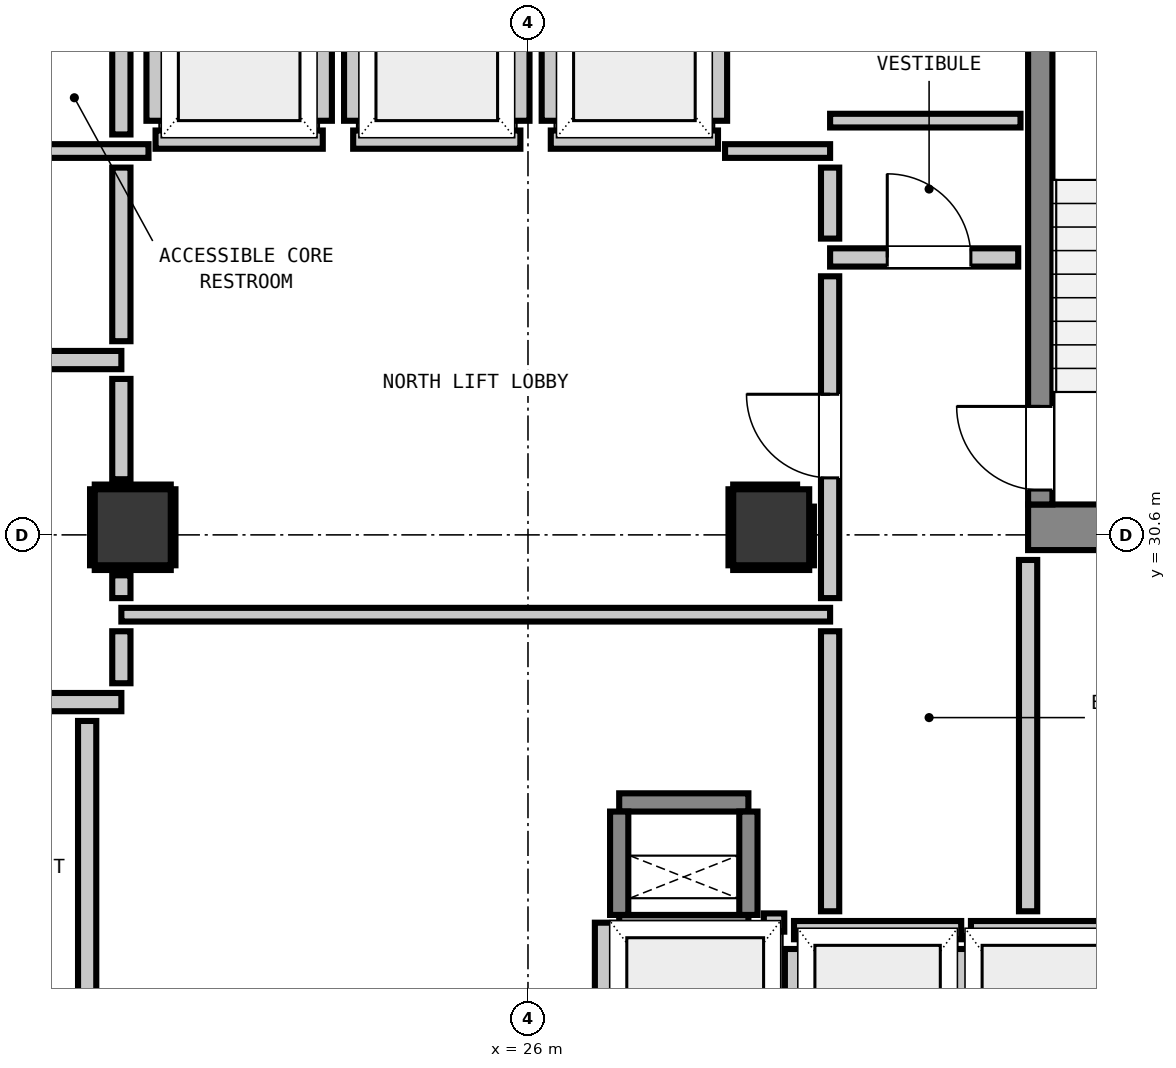
"""IFC4 building model, lengths in metres.
Left out: names, types, materials, properties, quantities, classifications, styles, units other than length and angle.
Written with IfcOpenShell. Run it as: python <this file> out.ifc"""

import sys

from ifc_helpers import new_model, si_unit, direction, frame, frame_2d, origin, origin_2d, place, context, subcontext, project, spatial, rectangle, extrude, element, fill, save


model = new_model("IFC4")
c1 = context("Model", 3, precision=1e-05, world=origin(), true_north=direction((0.0, 1.0)))
c2 = subcontext(c1, "Body", "Model", "MODEL_VIEW")
j1 = project(units=[si_unit("LENGTHUNIT", "METRE"), si_unit("PLANEANGLEUNIT", "RADIAN")], contexts=[c1])
p1 = place(None, origin())
s1 = spatial("IfcSite", under=j1, at=p1, CompositionType="ELEMENT")
p2 = place(p1, origin())
s2 = spatial("IfcBuilding", under=s1, at=p2, CompositionType="ELEMENT")
p3 = place(p2, frame((0.0, 0.0, 85.08)))
s3 = spatial("IfcBuildingStorey", under=s2, at=p3, CompositionType="ELEMENT", Elevation=85.08)
p4 = place(p3, frame((32.58, 30.7, 0.0), z_axis=(0.0, 0.0, 1.0), x_axis=(1.0, 0.0, 0.0)))
e1 = element("IfcWall", 1, at=p4, inside=s3, PredefinedType="SHEAR", context=c2, shape_type="SweptSolid", body=[
    extrude(rectangle(XDim=3.415, YDim=0.6, at=frame_2d((1.708, 0.0))), origin(), (0.0, 0.0, 1.0), 3.32),
])
p5 = place(p3, frame((32.74, 31.0, 0.0), z_axis=(0.0, 0.0, 1.0), x_axis=(0.0, 1.0, 0.0)))
e2 = element("IfcWall", 2, at=p5, inside=s3, PredefinedType="SHEAR", context=c2, shape_type="SweptSolid", body=[
    extrude(rectangle(XDim=7.8, YDim=0.32, at=frame_2d((3.9, 0.0))), origin(), (0.0, 0.0, 1.0), 3.32),
])
p6 = place(p5, frame((0.19, 0.0, 0.0)))
e3 = element("IfcOpeningElement", 3, at=p6, cuts=e2, PredefinedType="OPENING", context=c2, shape_type="SweptSolid", body=[
    extrude(rectangle(XDim=1.1, YDim=2.15, at=frame_2d((0.55, 1.075))), frame((0.0, 0.17, 0.0), z_axis=(0.0, -1.0, 0.0), x_axis=(1.0, 0.0, 0.0)), (0.0, 0.0, 1.0), 0.34),
])
for number, where, z_axis, x_axis in (
    (4, (27.2, 25.48, 0.0), (0.0, 0.0, 1.0), (1.0, 0.0, 0.0)),
    (5, (27.2, 27.08, 0.0), (0.0, 0.0, 1.0), (1.0, 0.0, 0.0)),
):
    element("IfcWall", number, at=place(p3, frame(where, z_axis=z_axis, x_axis=x_axis)), inside=s3, PredefinedType="SHEAR", context=c2, shape_type="SweptSolid", body=[
        extrude(rectangle(XDim=1.7, YDim=0.24, at=frame_2d((0.85, 0.0))), origin(), (0.0, 0.0, 1.0), 3.32),
    ])
for number, where, z_axis, x_axis in (
    (6, (27.2, 25.6, 0.0), (0.0, 0.0, 1.0), (0.0, 1.0, 0.0)),
    (7, (28.9, 25.6, 0.0), (0.0, 0.0, 1.0), (0.0, 1.0, 0.0)),
):
    element("IfcWall", number, at=place(p3, frame(where, z_axis=z_axis, x_axis=x_axis)), inside=s3, PredefinedType="SHEAR", context=c2, shape_type="SweptSolid", body=[
        extrude(rectangle(XDim=1.36, YDim=0.24, at=frame_2d((0.68, 0.0))), origin(), (0.0, 0.0, 1.0), 3.32),
    ])
for number, where, z_axis, x_axis in (
    (8, (20.8, 30.7, 0.0), (0.0, 0.0, 1.0), (1.0, 0.0, 0.0)),
    (9, (29.2, 30.7, 0.0), (0.0, 0.0, 1.0), (1.0, 0.0, 0.0)),
):
    element("IfcColumn", number, at=place(p3, frame(where, z_axis=z_axis, x_axis=x_axis)), inside=s3, PredefinedType="COLUMN", context=c2, shape_type="SweptSolid", body=[
        extrude(rectangle(XDim=1.0, YDim=1.0, at=origin_2d()), origin(), (0.0, 0.0, 1.0), 3.32),
    ])
p7 = place(p3, frame((21.1, 35.8, 0.0), z_axis=(0.0, 0.0, 1.0), x_axis=(1.0, 0.0, 0.0)))
e10 = element("IfcWall", 10, at=p7, inside=s3, PredefinedType="PARTITIONING", context=c2, shape_type="SweptSolid", body=[
    extrude(rectangle(XDim=2.2, YDim=0.24, at=frame_2d((1.1, 0.0))), origin(), (0.0, 0.0, 1.0), 2.96),
])
p8 = place(p3, frame((21.1, 36.048, 0.0), z_axis=(0.0, 0.0, 1.0), x_axis=(0.0, 1.0, 0.0)))
e11 = element("IfcWall", 11, at=p8, inside=s3, PredefinedType="PARTITIONING", context=c2, shape_type="SweptSolid", body=[
    extrude(rectangle(XDim=2.104, YDim=0.24, at=frame_2d((1.052, 0.0))), origin(), (0.0, 0.0, 1.0), 2.195),
])
p9 = place(p3, frame((23.3, 36.048, 0.0), z_axis=(0.0, 0.0, 1.0), x_axis=(0.0, 1.0, 0.0)))
e12 = element("IfcWall", 12, at=p9, inside=s3, PredefinedType="PARTITIONING", context=c2, shape_type="SweptSolid", body=[
    extrude(rectangle(XDim=2.104, YDim=0.24, at=frame_2d((1.052, 0.0))), origin(), (0.0, 0.0, 1.0), 2.96),
])
p10 = place(p3, frame((23.7, 35.8, 0.0), z_axis=(0.0, 0.0, 1.0), x_axis=(1.0, 0.0, 0.0)))
e13 = element("IfcWall", 13, at=p10, inside=s3, PredefinedType="PARTITIONING", context=c2, shape_type="SweptSolid", body=[
    extrude(rectangle(XDim=2.2, YDim=0.24, at=frame_2d((1.1, 0.0))), origin(), (0.0, 0.0, 1.0), 2.96),
])
for number, where, z_axis, x_axis in (
    (14, (23.7, 36.048, 0.0), (0.0, 0.0, 1.0), (0.0, 1.0, 0.0)),
    (15, (25.9, 36.048, 0.0), (0.0, 0.0, 1.0), (0.0, 1.0, 0.0)),
):
    element("IfcWall", number, at=place(p3, frame(where, z_axis=z_axis, x_axis=x_axis)), inside=s3, PredefinedType="PARTITIONING", context=c2, shape_type="SweptSolid", body=[
        extrude(rectangle(XDim=2.104, YDim=0.24, at=frame_2d((1.052, 0.0))), origin(), (0.0, 0.0, 1.0), 2.96),
    ])
p11 = place(p3, frame((26.3, 35.8, 0.0), z_axis=(0.0, 0.0, 1.0), x_axis=(1.0, 0.0, 0.0)))
e16 = element("IfcWall", 16, at=p11, inside=s3, PredefinedType="PARTITIONING", context=c2, shape_type="SweptSolid", body=[
    extrude(rectangle(XDim=2.2, YDim=0.24, at=frame_2d((1.1, 0.0))), origin(), (0.0, 0.0, 1.0), 2.96),
])
for number, where, z_axis, x_axis in (
    (17, (26.3, 36.048, 0.0), (0.0, 0.0, 1.0), (0.0, 1.0, 0.0)),
    (18, (28.5, 36.048, 0.0), (0.0, 0.0, 1.0), (0.0, 1.0, 0.0)),
):
    element("IfcWall", number, at=place(p3, frame(where, z_axis=z_axis, x_axis=x_axis)), inside=s3, PredefinedType="PARTITIONING", context=c2, shape_type="SweptSolid", body=[
        extrude(rectangle(XDim=2.104, YDim=0.24, at=frame_2d((1.052, 0.0))), origin(), (0.0, 0.0, 1.0), 2.96),
    ])
p12 = place(p3, frame((29.5, 25.4, 0.0), z_axis=(0.0, 0.0, 1.0), x_axis=(1.0, 0.0, 0.0)))
e19 = element("IfcWall", 19, at=p12, inside=s3, PredefinedType="PARTITIONING", context=c2, shape_type="SweptSolid", body=[
    extrude(rectangle(XDim=2.2, YDim=0.24, at=frame_2d((1.1, 0.0))), origin(), (0.0, 0.0, 1.0), 2.96),
])
p13 = place(p3, frame((29.5, 22.632, 0.0), z_axis=(0.0, 0.0, 1.0), x_axis=(0.0, 1.0, 0.0)))
e20 = element("IfcWall", 20, at=p13, inside=s3, PredefinedType="PARTITIONING", context=c2, shape_type="SweptSolid", body=[
    extrude(rectangle(XDim=2.52, YDim=0.24, at=frame_2d((1.26, 0.0))), origin(), (0.0, 0.0, 1.0), 2.195),
])
p14 = place(p3, frame((31.7, 22.73, 0.0), z_axis=(0.0, 0.0, 1.0), x_axis=(0.0, 1.0, 0.0)))
e21 = element("IfcWall", 21, at=p14, inside=s3, PredefinedType="PARTITIONING", context=c2, shape_type="SweptSolid", body=[
    extrude(rectangle(XDim=2.422, YDim=0.24, at=frame_2d((1.211, 0.0))), origin(), (0.0, 0.0, 1.0), 2.96),
])
p15 = place(p3, frame((31.828, 25.4, 0.0), z_axis=(0.0, 0.0, 1.0), x_axis=(1.0, 0.0, 0.0)))
e22 = element("IfcWall", 22, at=p15, inside=s3, PredefinedType="PARTITIONING", context=c2, shape_type="SweptSolid", body=[
    extrude(rectangle(XDim=2.072, YDim=0.24, at=frame_2d((1.036, 0.0))), origin(), (0.0, 0.0, 1.0), 2.96),
])
p16 = place(p3, frame((29.103, 25.5, 0.0), z_axis=(0.0, 0.0, 1.0), x_axis=(1.0, 0.0, 0.0)))
e23 = element("IfcWall", 23, at=p16, inside=s3, PredefinedType="PARTITIONING", context=c2, shape_type="SweptSolid", body=[
    extrude(rectangle(XDim=0.269, YDim=0.24, at=frame_2d((0.135, 0.0))), origin(), (0.0, 0.0, 1.0), 2.96),
])
p17 = place(p3, frame((27.0, 22.73, 0.0), z_axis=(0.0, 0.0, 1.0), x_axis=(0.0, 1.0, 0.0)))
e24 = element("IfcWall", 24, at=p17, inside=s3, PredefinedType="PARTITIONING", context=c2, shape_type="SweptSolid", body=[
    extrude(rectangle(XDim=2.768, YDim=0.24, at=frame_2d((1.384, 0.0))), origin(), (0.0, 0.0, 1.0), 2.96),
])
p18 = place(p3, frame((17.45, 28.4, 0.0), z_axis=(0.0, 0.0, 1.0), x_axis=(1.0, 0.0, 0.0)))
e25 = element("IfcWall", 25, at=p18, inside=s3, PredefinedType="PARTITIONING", context=c2, shape_type="SweptSolid", body=[
    extrude(rectangle(XDim=3.2, YDim=0.24, at=frame_2d((1.6, 0.0))), origin(), (0.0, 0.0, 1.0), 2.96),
])
p19 = place(p18, frame((0.784, 0.0, 0.0)))
e26 = element("IfcOpeningElement", 26, at=p19, cuts=e25, PredefinedType="OPENING", context=c2, shape_type="SweptSolid", body=[
    extrude(rectangle(XDim=1.1, YDim=2.15, at=frame_2d((0.55, 1.075))), frame((0.0, 0.13, 0.0), z_axis=(0.0, -1.0, 0.0), x_axis=(1.0, 0.0, 0.0)), (0.0, 0.0, 1.0), 0.26),
])
p20 = place(p3, frame((17.45, 32.9, 0.0), z_axis=(0.0, 0.0, 1.0), x_axis=(1.0, 0.0, 0.0)))
e27 = element("IfcWall", 27, at=p20, inside=s3, PredefinedType="PARTITIONING", context=c2, shape_type="SweptSolid", body=[
    extrude(rectangle(XDim=3.2, YDim=0.24, at=frame_2d((1.6, 0.0))), origin(), (0.0, 0.0, 1.0), 2.96),
])
p21 = place(p20, frame((0.159, 0.0, 0.0)))
e28 = element("IfcOpeningElement", 28, at=p21, cuts=e27, PredefinedType="OPENING", context=c2, shape_type="SweptSolid", body=[
    extrude(rectangle(XDim=1.1, YDim=2.15, at=frame_2d((0.55, 1.075))), frame((0.0, 0.13, 0.0), z_axis=(0.0, -1.0, 0.0), x_axis=(1.0, 0.0, 0.0)), (0.0, 0.0, 1.0), 0.26),
])
p22 = place(p3, frame((29.975, 34.25, 0.0), z_axis=(0.0, 0.0, 1.0), x_axis=(1.0, 0.0, 0.0)))
e29 = element("IfcWall", 29, at=p22, inside=s3, PredefinedType="PARTITIONING", context=c2, shape_type="SweptSolid", body=[
    extrude(rectangle(XDim=2.475, YDim=0.24, at=frame_2d((1.237, 0.0))), origin(), (0.0, 0.0, 1.0), 2.96),
])
p23 = place(p22, frame((0.752, 0.0, 0.0)))
e30 = element("IfcOpeningElement", 30, at=p23, cuts=e29, PredefinedType="OPENING", context=c2, shape_type="SweptSolid", body=[
    extrude(rectangle(XDim=1.1, YDim=2.15, at=frame_2d((0.55, 1.075))), frame((0.0, 0.13, 0.0), z_axis=(0.0, -1.0, 0.0), x_axis=(1.0, 0.0, 0.0)), (0.0, 0.0, 1.0), 0.26),
])
p24 = place(p3, frame((20.65, 29.55, 0.0), z_axis=(0.0, 0.0, 1.0), x_axis=(1.0, 0.0, 0.0)))
e31 = element("IfcWall", 31, at=p24, inside=s3, PredefinedType="PARTITIONING", context=c2, shape_type="SweptSolid", body=[
    extrude(rectangle(XDim=9.325, YDim=0.18, at=frame_2d((4.663, 0.0))), origin(), (0.0, 0.0, 1.0), 2.96),
])
p25 = place(p3, frame((18.95, 35.65, 0.0), z_axis=(0.0, 0.0, 1.0), x_axis=(1.0, 0.0, 0.0)))
e32 = element("IfcWall", 32, at=p25, inside=s3, PredefinedType="PARTITIONING", context=c2, shape_type="SweptSolid", body=[
    extrude(rectangle(XDim=2.057, YDim=0.18, at=frame_2d((1.029, 0.0))), origin(), (0.0, 0.0, 1.0), 2.96),
])
p26 = place(p3, frame((28.593, 35.65, 0.0), z_axis=(0.0, 0.0, 1.0), x_axis=(1.0, 0.0, 0.0)))
e33 = element("IfcWall", 33, at=p26, inside=s3, PredefinedType="PARTITIONING", context=c2, shape_type="SweptSolid", body=[
    extrude(rectangle(XDim=1.382, YDim=0.18, at=frame_2d((0.691, 0.0))), origin(), (0.0, 0.0, 1.0), 2.96),
])
p27 = place(p3, frame((29.975, 36.05, 0.0), z_axis=(0.0, 0.0, 1.0), x_axis=(1.0, 0.0, 0.0)))
e34 = element("IfcWall", 34, at=p27, inside=s3, PredefinedType="PARTITIONING", context=c2, shape_type="SweptSolid", body=[
    extrude(rectangle(XDim=2.505, YDim=0.18, at=frame_2d((1.252, 0.0))), origin(), (0.0, 0.0, 1.0), 2.96),
])
p28 = place(p3, frame((20.2, 22.586, 0.0), z_axis=(0.0, 0.0, 1.0), x_axis=(0.0, 1.0, 0.0)))
e35 = element("IfcWall", 35, at=p28, inside=s3, PredefinedType="PARTITIONING", context=c2, shape_type="SweptSolid", body=[
    extrude(rectangle(XDim=5.566, YDim=0.24, at=frame_2d((2.783, 0.0))), origin(), (0.0, 0.0, 1.0), 2.96),
])
p29 = place(p3, frame((20.65, 28.648, 0.0), z_axis=(0.0, 0.0, 1.0), x_axis=(0.0, 1.0, 0.0)))
e36 = element("IfcWall", 36, at=p29, inside=s3, PredefinedType="PARTITIONING", context=c2, shape_type="SweptSolid", body=[
    extrude(rectangle(XDim=0.684, YDim=0.24, at=frame_2d((0.342, 0.0))), origin(), (0.0, 0.0, 1.0), 2.195),
])
p30 = place(p3, frame((20.65, 29.768, 0.0), z_axis=(0.0, 0.0, 1.0), x_axis=(0.0, 1.0, 0.0)))
e37 = element("IfcWall", 37, at=p30, inside=s3, PredefinedType="PARTITIONING", context=c2, shape_type="SweptSolid", body=[
    extrude(rectangle(XDim=0.3, YDim=0.24, at=frame_2d((0.15, 0.0))), origin(), (0.0, 0.0, 1.0), 2.195),
])
p31 = place(p3, frame((20.65, 31.332, 0.0), z_axis=(0.0, 0.0, 1.0), x_axis=(0.0, 1.0, 0.0)))
e38 = element("IfcWall", 38, at=p31, inside=s3, PredefinedType="PARTITIONING", context=c2, shape_type="SweptSolid", body=[
    extrude(rectangle(XDim=1.32, YDim=0.24, at=frame_2d((0.66, 0.0))), origin(), (0.0, 0.0, 1.0), 2.195),
])
p32 = place(p3, frame((20.65, 33.148, 0.0), z_axis=(0.0, 0.0, 1.0), x_axis=(0.0, 1.0, 0.0)))
e39 = element("IfcWall", 39, at=p32, inside=s3, PredefinedType="PARTITIONING", context=c2, shape_type="SweptSolid", body=[
    extrude(rectangle(XDim=2.284, YDim=0.24, at=frame_2d((1.142, 0.0))), origin(), (0.0, 0.0, 1.0), 2.195),
])
p33 = place(p3, frame((20.65, 35.868, 0.0), z_axis=(0.0, 0.0, 1.0), x_axis=(0.0, 1.0, 0.0)))
e40 = element("IfcWall", 40, at=p33, inside=s3, PredefinedType="PARTITIONING", context=c2, shape_type="SweptSolid", body=[
    extrude(rectangle(XDim=2.684, YDim=0.24, at=frame_2d((1.342, 0.0))), origin(), (0.0, 0.0, 1.0), 2.195),
])
p34 = place(p3, frame((29.975, 25.648, 0.0), z_axis=(0.0, 0.0, 1.0), x_axis=(0.0, 1.0, 0.0)))
e41 = element("IfcWall", 41, at=p34, inside=s3, PredefinedType="PARTITIONING", context=c2, shape_type="SweptSolid", body=[
    extrude(rectangle(XDim=3.684, YDim=0.24, at=frame_2d((1.842, 0.0))), origin(), (0.0, 0.0, 1.0), 2.96),
])
p35 = place(p3, frame((29.975, 29.768, 0.0), z_axis=(0.0, 0.0, 1.0), x_axis=(0.0, 1.0, 0.0)))
e42 = element("IfcWall", 42, at=p35, inside=s3, PredefinedType="PARTITIONING", context=c2, shape_type="SweptSolid", body=[
    extrude(rectangle(XDim=4.234, YDim=0.24, at=frame_2d((2.117, 0.0))), origin(), (0.0, 0.0, 1.0), 2.96),
])
p36 = place(p35, frame((1.582, 0.0, 0.0)))
e43 = element("IfcOpeningElement", 43, at=p36, cuts=e42, PredefinedType="OPENING", context=c2, shape_type="SweptSolid", body=[
    extrude(rectangle(XDim=1.1, YDim=2.15, at=frame_2d((0.55, 1.075))), frame((0.0, 0.13, 0.0), z_axis=(0.0, -1.0, 0.0), x_axis=(1.0, 0.0, 0.0)), (0.0, 0.0, 1.0), 0.26),
])
p37 = place(p3, frame((29.975, 34.498, 0.0), z_axis=(0.0, 0.0, 1.0), x_axis=(0.0, 1.0, 0.0)))
e44 = element("IfcWall", 44, at=p37, inside=s3, PredefinedType="PARTITIONING", context=c2, shape_type="SweptSolid", body=[
    extrude(rectangle(XDim=0.934, YDim=0.24, at=frame_2d((0.467, 0.0))), origin(), (0.0, 0.0, 1.0), 2.96),
])
p38 = place(p3, frame((32.58, 25.648, 0.0), z_axis=(0.0, 0.0, 1.0), x_axis=(0.0, 1.0, 0.0)))
e45 = element("IfcWall", 45, at=p38, inside=s3, PredefinedType="PARTITIONING", context=c2, shape_type="SweptSolid", body=[
    extrude(rectangle(XDim=4.622, YDim=0.24, at=frame_2d((2.311, 0.0))), origin(), (0.0, 0.0, 1.0), 2.96),
])
for number, where, z_axis, x_axis in (
    (46, (20.3, 30.168, 0.0), (0.0, 0.0, 1.0), (1.0, 0.0, 0.0)),
    (47, (20.3, 31.232, 0.0), (0.0, 0.0, 1.0), (1.0, 0.0, 0.0)),
    (48, (20.268, 30.2, 0.0), (0.0, 0.0, 1.0), (0.0, 1.0, 0.0)),
    (49, (21.332, 30.2, 0.0), (0.0, 0.0, 1.0), (0.0, 1.0, 0.0)),
    (50, (28.7, 30.168, 0.0), (0.0, 0.0, 1.0), (1.0, 0.0, 0.0)),
):
    element("IfcWall", number, at=place(p3, frame(where, z_axis=z_axis, x_axis=x_axis)), inside=s3, PredefinedType="PARTITIONING", context=c2, shape_type="SweptSolid", body=[
        extrude(rectangle(XDim=1.0, YDim=0.06, at=frame_2d((0.5, 0.0))), origin(), (0.0, 0.0, 1.0), 1.45),
    ])
p39 = place(p3, frame((28.7, 31.232, 0.0), z_axis=(0.0, 0.0, 1.0), x_axis=(1.0, 0.0, 0.0)))
e51 = element("IfcWall", 51, at=p39, inside=s3, PredefinedType="PARTITIONING", context=c2, shape_type="SweptSolid", body=[
    extrude(rectangle(XDim=0.841, YDim=0.06, at=frame_2d((0.42, 0.0))), origin(), (0.0, 0.0, 1.0), 1.45),
])
p40 = place(p3, frame((28.668, 30.2, 0.0), z_axis=(0.0, 0.0, 1.0), x_axis=(0.0, 1.0, 0.0)))
e52 = element("IfcWall", 52, at=p40, inside=s3, PredefinedType="PARTITIONING", context=c2, shape_type="SweptSolid", body=[
    extrude(rectangle(XDim=1.0, YDim=0.06, at=frame_2d((0.5, 0.0))), origin(), (0.0, 0.0, 1.0), 1.45),
])
p41 = place(p3, frame((29.732, 30.2, 0.0), z_axis=(0.0, 0.0, 1.0), x_axis=(0.0, 1.0, 0.0)))
e53 = element("IfcWall", 53, at=p41, inside=s3, PredefinedType="PARTITIONING", context=c2, shape_type="SweptSolid", body=[
    extrude(rectangle(XDim=0.772, YDim=0.06, at=frame_2d((0.386, 0.0))), origin(), (0.0, 0.0, 1.0), 1.45),
])
p42 = place(p6, origin())
e54 = element("IfcDoor", 54, at=p42, inside=s3, OperationType="SINGLE_SWING_RIGHT", PredefinedType="DOOR", context=c2, shape_type="SweptSolid", body=[
    extrude(rectangle(XDim=1.1, YDim=2.15, at=frame_2d((0.55, 1.075))), frame((0.0, 0.025, 0.0), z_axis=(0.0, -1.0, 0.0), x_axis=(1.0, 0.0, 0.0)), (0.0, 0.0, 1.0), 0.05),
])
fill(e3, e54)
p43 = place(p36, origin())
e55 = element("IfcDoor", 55, at=p43, inside=s3, OperationType="SINGLE_SWING_RIGHT", PredefinedType="DOOR", context=c2, shape_type="SweptSolid", body=[
    extrude(rectangle(XDim=1.1, YDim=2.15, at=frame_2d((0.55, 1.075))), frame((0.0, 0.025, 0.0), z_axis=(0.0, -1.0, 0.0), x_axis=(1.0, 0.0, 0.0)), (0.0, 0.0, 1.0), 0.05),
])
fill(e43, e55)
p44 = place(p23, origin())
e56 = element("IfcDoor", 56, at=p44, inside=s3, OperationType="SINGLE_SWING_LEFT", PredefinedType="DOOR", context=c2, shape_type="SweptSolid", body=[
    extrude(rectangle(XDim=1.1, YDim=2.15, at=frame_2d((0.55, 1.075))), frame((0.0, 0.025, 0.0), z_axis=(0.0, -1.0, 0.0), x_axis=(1.0, 0.0, 0.0)), (0.0, 0.0, 1.0), 0.05),
])
fill(e30, e56)
save(model, sys.argv[1])
